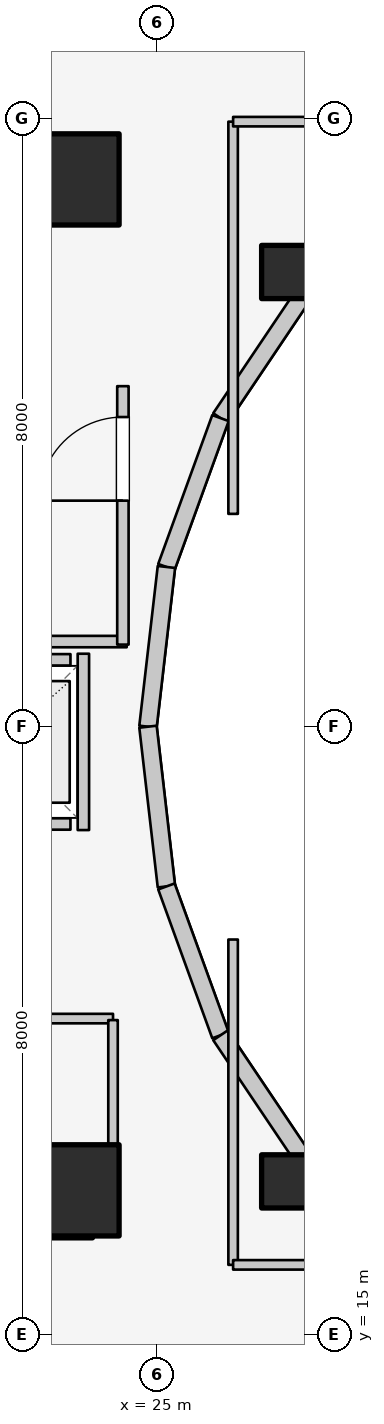
"""IFC4 building model, lengths in metres.
Left out: names, types, materials, properties, quantities, classifications, styles, units other than length and angle.
Written with IfcOpenShell. Run it as: python <this file> out.ifc"""

import sys

from ifc_helpers import new_model, si_unit, direction, frame, frame_2d, origin, origin_2d, place, context, subcontext, project, spatial, rectangle, extrude, element, fill, save


model = new_model("IFC4")
c1 = context("Model", 3, precision=1e-05, world=origin(), true_north=direction((0.0, 1.0)))
c2 = subcontext(c1, "Body", "Model", "MODEL_VIEW")
j1 = project(units=[si_unit("LENGTHUNIT", "METRE"), si_unit("PLANEANGLEUNIT", "RADIAN")], contexts=[c1])
p1 = place(None, origin())
s1 = spatial("IfcSite", under=j1, at=p1, CompositionType="ELEMENT")
p2 = place(p1, origin())
s2 = spatial("IfcBuilding", under=s1, at=p2, CompositionType="ELEMENT")
p3 = place(p2, frame((0.0, 0.0, 235.7)))
s3 = spatial("IfcBuildingStorey", under=s2, at=p3, CompositionType="ELEMENT", Elevation=235.7)
for number, where, z_axis, x_axis in (
    (1, (19.65, 16.55, 0.0), (0.0, 0.0, 1.0), (1.0, 0.0, 0.0)),
    (2, (19.65, 30.35, 0.0), (0.0, 0.0, 1.0), (1.0, 0.0, 0.0)),
):
    element("IfcWall", number, at=place(p3, frame(where, z_axis=z_axis, x_axis=x_axis)), inside=s3, PredefinedType="SHEAR", context=c2, shape_type="SweptSolid", body=[
        extrude(rectangle(XDim=4.5, YDim=0.55, at=frame_2d((2.25, 0.0))), origin(), (0.0, 0.0, 1.0), 3.1),
    ])
for number, where, z_axis, x_axis in (
    (3, (23.9, 16.9, 0.0), (0.0, 0.0, 1.0), (1.0, 0.0, 0.0)),
    (4, (23.9, 30.2, 0.0), (0.0, 0.0, 1.0), (1.0, 0.0, 0.0)),
):
    element("IfcColumn", number, at=place(p3, frame(where, z_axis=z_axis, x_axis=x_axis)), inside=s3, PredefinedType="COLUMN", context=c2, shape_type="SweptSolid", body=[
        extrude(rectangle(XDim=1.2, YDim=1.2, at=origin_2d()), origin(), (0.0, 0.0, 1.0), 3.1),
    ])
for number, where, z_axis, x_axis in (
    (5, (26.725, 28.982, 0.0), (0.0, 0.0, 1.0), (1.0, 0.0, 0.0)),
    (6, (26.725, 17.018, 0.0), (0.0, 0.0, 1.0), (1.0, 0.0, 0.0)),
):
    element("IfcColumn", number, at=place(p3, frame(where, z_axis=z_axis, x_axis=x_axis)), inside=s3, PredefinedType="COLUMN", context=c2, shape_type="SweptSolid", body=[
        extrude(rectangle(XDim=0.7, YDim=0.7, at=origin_2d()), origin(), (0.0, 0.0, 1.0), 3.1),
    ])
p4 = place(p3, frame((28.44, 30.032, 0.0), z_axis=(0.0, 0.0, 1.0), x_axis=(-0.752576694707, -0.658504607869, 0.0)))
e7 = element("IfcWall", 7, at=p4, inside=s3, PredefinedType="STANDARD", context=c2, shape_type="SweptSolid", body=[
    extrude(rectangle(XDim=1.959, YDim=0.23, at=frame_2d((0.98, 0.0))), origin(), (0.0, 0.0, 1.0), 1.22),
])
p5 = place(p3, frame((26.965, 28.742, 0.0), z_axis=(0.0, 0.0, 1.0), x_axis=(-0.558197800898, -0.829707909492, 0.0)))
e8 = element("IfcWall", 8, at=p5, inside=s3, PredefinedType="STANDARD", context=c2, shape_type="SweptSolid", body=[
    extrude(rectangle(XDim=2.027, YDim=0.23, at=frame_2d((1.013, 0.0))), origin(), (0.0, 0.0, 1.0), 1.22),
])
p6 = place(p3, frame((25.834, 27.06, 0.0), z_axis=(0.0, 0.0, 1.0), x_axis=(-0.341423187295, -0.93990968033, 0.0)))
e9 = element("IfcWall", 9, at=p6, inside=s3, PredefinedType="STANDARD", context=c2, shape_type="SweptSolid", body=[
    extrude(rectangle(XDim=2.084, YDim=0.23, at=frame_2d((1.042, 0.0))), origin(), (0.0, 0.0, 1.0), 2.56),
])
for number, where, z_axis, x_axis in (
    (10, (25.123, 25.102, 0.0), (0.0, 0.0, 1.0), (-0.115, -0.993, 0.0)),
    (11, (24.88, 23.0, 0.0), (0.0, 0.0, 1.0), (0.115, -0.993, 0.0)),
):
    element("IfcWall", number, at=place(p3, frame(where, z_axis=z_axis, x_axis=x_axis)), inside=s3, PredefinedType="STANDARD", context=c2, shape_type="SweptSolid", body=[
        extrude(rectangle(XDim=2.115, YDim=0.23, at=frame_2d((1.058, 0.0))), origin(), (0.0, 0.0, 1.0), 2.56),
    ])
p7 = place(p3, frame((25.123, 20.898, 0.0), z_axis=(0.0, 0.0, 1.0), x_axis=(0.341423187295, -0.93990968033, 0.0)))
e12 = element("IfcWall", 12, at=p7, inside=s3, PredefinedType="STANDARD", context=c2, shape_type="SweptSolid", body=[
    extrude(rectangle(XDim=2.084, YDim=0.23, at=frame_2d((1.042, 0.0))), origin(), (0.0, 0.0, 1.0), 2.56),
])
p8 = place(p3, frame((25.834, 18.94, 0.0), z_axis=(0.0, 0.0, 1.0), x_axis=(0.558197800898, -0.829707909492, 0.0)))
e13 = element("IfcWall", 13, at=p8, inside=s3, PredefinedType="STANDARD", context=c2, shape_type="SweptSolid", body=[
    extrude(rectangle(XDim=2.027, YDim=0.23, at=frame_2d((1.013, 0.0))), origin(), (0.0, 0.0, 1.0), 1.22),
])
p9 = place(p3, frame((26.965, 17.258, 0.0), z_axis=(0.0, 0.0, 1.0), x_axis=(0.752576694707, -0.658504607869, 0.0)))
e14 = element("IfcWall", 14, at=p9, inside=s3, PredefinedType="STANDARD", context=c2, shape_type="SweptSolid", body=[
    extrude(rectangle(XDim=1.959, YDim=0.23, at=frame_2d((0.98, 0.0))), origin(), (0.0, 0.0, 1.0), 1.22),
])
p10 = place(p3, frame((22.04, 21.72, 0.0), z_axis=(0.0, 0.0, 1.0), x_axis=(1.0, 0.0, 0.0)))
e15 = element("IfcWall", 15, at=p10, inside=s3, PredefinedType="SOLIDWALL", context=c2, shape_type="SweptSolid", body=[
    extrude(rectangle(XDim=1.82, YDim=0.15, at=frame_2d((0.91, 0.0))), origin(), (0.0, 0.0, 1.0), 2.12),
])
p11 = place(p10, frame((0.36, 0.0, 0.0)))
e16 = element("IfcOpeningElement", 16, at=p11, cuts=e15, PredefinedType="OPENING", context=c2, shape_type="SweptSolid", body=[
    extrude(rectangle(XDim=1.1, YDim=2.1, at=frame_2d((0.55, 1.05))), frame((0.0, 0.085, 0.0), z_axis=(0.0, -1.0, 0.0), x_axis=(1.0, 0.0, 0.0)), (0.0, 0.0, 1.0), 0.17),
])
p12 = place(p3, frame((22.04, 23.88, 0.0), z_axis=(0.0, 0.0, 1.0), x_axis=(1.0, 0.0, 0.0)))
e17 = element("IfcWall", 17, at=p12, inside=s3, PredefinedType="SOLIDWALL", context=c2, shape_type="SweptSolid", body=[
    extrude(rectangle(XDim=1.82, YDim=0.15, at=frame_2d((0.91, 0.0))), origin(), (0.0, 0.0, 1.0), 2.12),
])
p13 = place(p3, frame((24.03, 21.64, 0.0), z_axis=(0.0, 0.0, 1.0), x_axis=(0.0, 1.0, 0.0)))
e18 = element("IfcWall", 18, at=p13, inside=s3, PredefinedType="SOLIDWALL", context=c2, shape_type="SweptSolid", body=[
    extrude(rectangle(XDim=2.32, YDim=0.15, at=frame_2d((1.16, 0.0))), origin(), (0.0, 0.0, 1.0), 2.12),
])
p14 = place(p3, frame((19.52, 24.12, 0.0), z_axis=(0.0, 0.0, 1.0), x_axis=(1.0, 0.0, 0.0)))
e19 = element("IfcWall", 19, at=p14, inside=s3, PredefinedType="PARTITIONING", context=c2, shape_type="SweptSolid", body=[
    extrude(rectangle(XDim=5.08, YDim=0.15, at=frame_2d((2.54, 0.0))), origin(), (0.0, 0.0, 1.0), 2.12),
])
p15 = place(p3, frame((24.55, 24.08, 0.0), z_axis=(0.0, 0.0, 1.0), x_axis=(0.0, 1.0, 0.0)))
e20 = element("IfcWall", 20, at=p15, inside=s3, PredefinedType="PARTITIONING", context=c2, shape_type="SweptSolid", body=[
    extrude(rectangle(XDim=3.4, YDim=0.15, at=frame_2d((1.7, 0.0))), origin(), (0.0, 0.0, 1.0), 2.575),
])
p16 = place(p15, frame((1.894, 0.0, 0.0)))
e21 = element("IfcOpeningElement", 21, at=p16, cuts=e20, PredefinedType="OPENING", context=c2, shape_type="SweptSolid", body=[
    extrude(rectangle(XDim=1.1, YDim=2.1, at=frame_2d((0.55, 1.05))), frame((0.0, 0.085, 0.0), z_axis=(0.0, -1.0, 0.0), x_axis=(1.0, 0.0, 0.0)), (0.0, 0.0, 1.0), 0.17),
])
p17 = place(p3, frame((19.55, 19.16, 0.0), z_axis=(0.0, 0.0, 1.0), x_axis=(1.0, 0.0, 0.0)))
e22 = element("IfcWall", 22, at=p17, inside=s3, PredefinedType="PARTITIONING", context=c2, shape_type="SweptSolid", body=[
    extrude(rectangle(XDim=4.87, YDim=0.125, at=frame_2d((2.435, 0.0))), origin(), (0.0, 0.0, 1.0), 2.12),
])
p18 = place(p17, frame((2.272, 0.0, 0.0)))
e23 = element("IfcOpeningElement", 23, at=p18, cuts=e22, PredefinedType="OPENING", context=c2, shape_type="SweptSolid", body=[
    extrude(rectangle(XDim=0.85, YDim=2.05, at=frame_2d((0.425, 1.025))), frame((0.0, 0.073, 0.0), z_axis=(0.0, -1.0, 0.0), x_axis=(1.0, 0.0, 0.0)), (0.0, 0.0, 1.0), 0.145),
])
p19 = place(p3, frame((24.42, 17.1, 0.0), z_axis=(0.0, 0.0, 1.0), x_axis=(0.0, 1.0, 0.0)))
e24 = element("IfcWall", 24, at=p19, inside=s3, PredefinedType="PARTITIONING", context=c2, shape_type="SweptSolid", body=[
    extrude(rectangle(XDim=2.04, YDim=0.125, at=frame_2d((1.02, 0.0))), origin(), (0.0, 0.0, 1.0), 1.952),
])
p20 = place(p3, frame((28.45, 30.015, 0.0), z_axis=(0.0, 0.0, 1.0), x_axis=(-0.522763432117, 0.852477796802, 0.0)))
e25 = element("IfcWall", 25, at=p20, inside=s3, PredefinedType="PARTITIONING", context=c2, shape_type="SweptSolid", body=[
    extrude(rectangle(XDim=3.269, YDim=0.125, at=frame_2d((1.635, 0.0))), origin(), (0.0, 0.0, 1.0), 1.22),
])
p21 = place(p3, frame((28.45, 15.985, 0.0), z_axis=(0.0, 0.0, 1.0), x_axis=(-0.52592395012, -0.850531597702, 0.0)))
e26 = element("IfcWall", 26, at=p21, inside=s3, PredefinedType="PARTITIONING", context=c2, shape_type="SweptSolid", body=[
    extrude(rectangle(XDim=2.869, YDim=0.125, at=frame_2d((1.435, 0.0))), origin(), (0.0, 0.0, 1.0), 2.096),
])
p22 = place(p3, frame((26.0, 25.8, 0.0), z_axis=(0.0, 0.0, 1.0), x_axis=(0.0, 1.0, 0.0)))
e27 = element("IfcWall", 27, at=p22, inside=s3, PredefinedType="PARTITIONING", context=c2, shape_type="SweptSolid", body=[
    extrude(rectangle(XDim=5.16, YDim=0.125, at=frame_2d((2.58, 0.0))), origin(), (0.0, 0.0, 1.0), 1.952),
])
p23 = place(p3, frame((26.0, 30.96, 0.0), z_axis=(0.0, 0.0, 1.0), x_axis=(1.0, 0.0, 0.0)))
e28 = element("IfcWall", 28, at=p23, inside=s3, PredefinedType="PARTITIONING", context=c2, shape_type="SweptSolid", body=[
    extrude(rectangle(XDim=2.6, YDim=0.125, at=frame_2d((1.3, 0.0))), origin(), (0.0, 0.0, 1.0), 1.22),
])
p24 = place(p3, frame((26.0, 15.92, 0.0), z_axis=(0.0, 0.0, 1.0), x_axis=(0.0, 1.0, 0.0)))
e29 = element("IfcWall", 29, at=p24, inside=s3, PredefinedType="PARTITIONING", context=c2, shape_type="SweptSolid", body=[
    extrude(rectangle(XDim=4.28, YDim=0.125, at=frame_2d((2.14, 0.0))), origin(), (0.0, 0.0, 1.0), 1.952),
])
p25 = place(p3, frame((26.0, 15.92, 0.0), z_axis=(0.0, 0.0, 1.0), x_axis=(1.0, 0.0, 0.0)))
e30 = element("IfcWall", 30, at=p25, inside=s3, PredefinedType="PARTITIONING", context=c2, shape_type="SweptSolid", body=[
    extrude(rectangle(XDim=2.6, YDim=0.125, at=frame_2d((1.3, 0.0))), origin(), (0.0, 0.0, 1.0), 1.952),
])
p26 = place(p16, origin())
e31 = element("IfcDoor", 31, at=p26, inside=s3, OperationType="SINGLE_SWING_LEFT", PredefinedType="DOOR", context=c2, shape_type="SweptSolid", body=[
    extrude(rectangle(XDim=1.1, YDim=2.1, at=frame_2d((0.55, 1.05))), frame((0.0, 0.025, 0.0), z_axis=(0.0, -1.0, 0.0), x_axis=(1.0, 0.0, 0.0)), (0.0, 0.0, 1.0), 0.05),
])
fill(e21, e31)
save(model, sys.argv[1])
